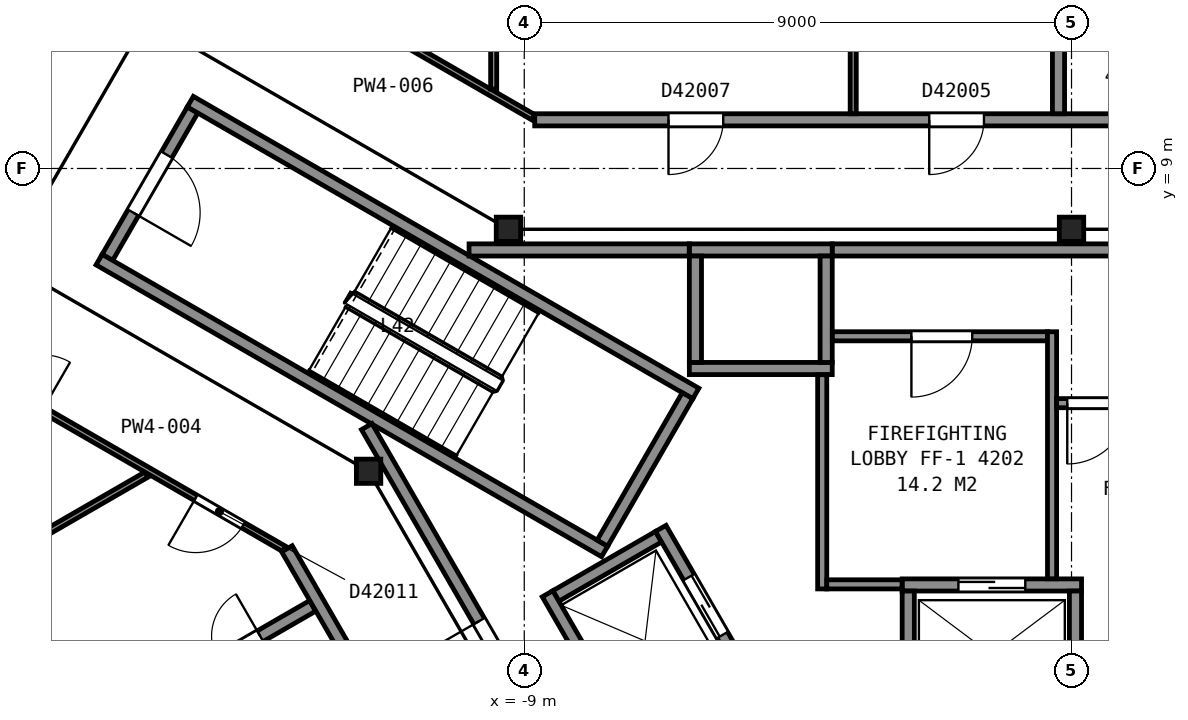
"""IFC4 building model, lengths in metres.
Left out: names, types, materials, properties, quantities, classifications, styles, units other than length and angle.
Written with IfcOpenShell. Run it as: python <this file> out.ifc"""

import sys

from ifc_helpers import new_model, si_unit, direction, frame, frame_2d, origin, origin_2d, place, context, subcontext, project, spatial, rectangle, i_section, extrude, element, fill, save


model = new_model("IFC4")
c1 = context("Model", 3, precision=1e-05, world=origin(), true_north=direction((0.0, 1.0)))
c2 = subcontext(c1, "Body", "Model", "MODEL_VIEW")
j1 = project(units=[si_unit("LENGTHUNIT", "METRE"), si_unit("PLANEANGLEUNIT", "RADIAN")], contexts=[c1])
p1 = place(None, origin())
s1 = spatial("IfcSite", under=j1, at=p1, CompositionType="ELEMENT")
p2 = place(p1, origin())
s2 = spatial("IfcBuilding", under=s1, at=p2, CompositionType="ELEMENT")
p3 = place(p2, frame((0.0, 0.0, 171.0)))
s3 = spatial("IfcBuildingStorey", under=s2, at=p3, CompositionType="ELEMENT", Elevation=171.0)
for number, where, z_axis, x_axis in (
    (1, (0.0, 8.0, 0.0), (0.0, 0.0, 1.0), (1.0, 0.0, 0.0)),
    (2, (-9.26, 8.0, 0.0), (0.0, 0.0, 1.0), (1.0, 0.0, 0.0)),
    (3, (-11.56, 4.02, 0.0), (0.0, 0.0, 1.0), (1.0, 0.0, 0.0)),
):
    element("IfcColumn", number, at=place(p3, frame(where, z_axis=z_axis, x_axis=x_axis)), inside=s3, PredefinedType="COLUMN", context=c2, shape_type="SweptSolid", body=[
        extrude(i_section(OverallWidth=0.401, OverallDepth=0.399, WebThickness=0.025, FlangeThickness=0.04, FilletRadius=0.015, at=origin_2d()), origin(), (0.0, 0.0, 1.0), 3.7),
    ])
p4 = place(p3, frame((-14.455, 9.962, 0.0), z_axis=(0.0, 0.0, 1.0), x_axis=(-0.500049511043, -0.865996816683, 0.0)))
e4 = element("IfcWall", 4, at=p4, inside=s3, PredefinedType="PARTITIONING", context=c2, shape_type="SweptSolid", body=[
    extrude(rectangle(XDim=2.8, YDim=0.2, at=frame_2d((1.4, 0.0))), origin(), (0.0, 0.0, 1.0), 3.45),
])
p5 = place(p4, frame((0.85, 0.0, 0.0)))
e5 = element("IfcOpeningElement", 5, at=p5, cuts=e4, PredefinedType="OPENING", context=c2, shape_type="SweptSolid", body=[
    extrude(rectangle(XDim=1.1, YDim=2.1, at=frame_2d((0.55, 1.05))), frame((0.0, 0.11, 0.0), z_axis=(0.0, -1.0, 0.0), x_axis=(1.0, 0.0, 0.0)), (0.0, 0.0, 1.0), 0.22),
])
for number, where, z_axis, x_axis in (
    (6, (-7.678, 2.701, 0.0), (0.0, 0.0, 1.0), (-0.866, 0.5, 0.0)),
    (7, (-6.178, 5.299, 0.0), (0.0, 0.0, 1.0), (-0.866, 0.5, 0.0)),
):
    element("IfcWall", number, at=place(p3, frame(where, z_axis=z_axis, x_axis=x_axis)), inside=s3, PredefinedType="PARTITIONING", context=c2, shape_type="SweptSolid", body=[
        extrude(rectangle(XDim=9.6, YDim=0.2, at=frame_2d((4.8, 0.0))), origin(), (0.0, 0.0, 1.0), 3.45),
    ])
p6 = place(p3, frame((-6.315, 5.262, 0.0), z_axis=(0.0, 0.0, 1.0), x_axis=(-0.500049511043, -0.865996816683, 0.0)))
e8 = element("IfcWall", 8, at=p6, inside=s3, PredefinedType="PARTITIONING", context=c2, shape_type="SweptSolid", body=[
    extrude(rectangle(XDim=2.8, YDim=0.2, at=frame_2d((1.4, 0.0))), origin(), (0.0, 0.0, 1.0), 3.45),
])
p7 = place(p3, frame((-2.785, 2.15, 0.0), z_axis=(0.0, 0.0, 1.0), x_axis=(1.0, 0.0, 0.0)))
e9 = element("IfcWall", 9, at=p7, inside=s3, PredefinedType="PARTITIONING", context=c2, shape_type="SweptSolid", body=[
    extrude(rectangle(XDim=2.95, YDim=0.2, at=frame_2d((1.475, 0.0))), origin(), (0.0, 0.0, 1.0), 3.7),
])
p8 = place(p7, frame((0.925, 0.0, 0.0)))
e10 = element("IfcOpeningElement", 10, at=p8, cuts=e9, PredefinedType="OPENING", context=c2, shape_type="SweptSolid", body=[
    extrude(rectangle(XDim=1.1, YDim=2.1, at=frame_2d((0.55, 1.05))), frame((0.0, 0.11, 0.0), z_axis=(0.0, -1.0, 0.0), x_axis=(1.0, 0.0, 0.0)), (0.0, 0.0, 1.0), 0.22),
])
for number, where, z_axis, x_axis in (
    (11, (-6.285, 5.71, 0.0), (0.0, 0.0, 1.0), (1.0, 0.0, 0.0)),
    (12, (-6.285, 7.66, 0.0), (0.0, 0.0, 1.0), (1.0, 0.0, 0.0)),
):
    element("IfcWall", number, at=place(p3, frame(where, z_axis=z_axis, x_axis=x_axis)), inside=s3, PredefinedType="PARTITIONING", context=c2, shape_type="SweptSolid", body=[
        extrude(rectangle(XDim=2.35, YDim=0.2, at=frame_2d((1.175, 0.0))), origin(), (0.0, 0.0, 1.0), 3.7),
    ])
for number, where, z_axis, x_axis in (
    (13, (-8.48, 1.969, 0.0), (0.0, 0.0, 1.0), (0.866, 0.5, 0.0)),
    (14, (0.065, 0.1, 0.0), (0.0, 0.0, 1.0), (0.0, 1.0, 0.0)),
    (15, (-2.685, 0.1, 0.0), (0.0, 0.0, 1.0), (0.0, 1.0, 0.0)),
):
    element("IfcWall", number, at=place(p3, frame(where, z_axis=z_axis, x_axis=x_axis)), inside=s3, PredefinedType="PARTITIONING", context=c2, shape_type="SweptSolid", body=[
        extrude(rectangle(XDim=1.95, YDim=0.2, at=frame_2d((0.975, 0.0))), origin(), (0.0, 0.0, 1.0), 3.7),
    ])
for number, where, z_axis, x_axis in (
    (16, (-4.035, 5.81, 0.0), (0.0, 0.0, 1.0), (0.0, 1.0, 0.0)),
    (17, (-6.185, 5.81, 0.0), (0.0, 0.0, 1.0), (0.0, 1.0, 0.0)),
):
    element("IfcWall", number, at=place(p3, frame(where, z_axis=z_axis, x_axis=x_axis)), inside=s3, PredefinedType="PARTITIONING", context=c2, shape_type="SweptSolid", body=[
        extrude(rectangle(XDim=1.75, YDim=0.2, at=frame_2d((0.875, 0.0))), origin(), (0.0, 0.0, 1.0), 3.7),
    ])
p9 = place(p3, frame((-5.28, 0.525, 0.0), z_axis=(0.0, 0.0, 1.0), x_axis=(-0.500037662692, 0.866003658127, 0.0)))
e18 = element("IfcWall", 18, at=p9, inside=s3, PredefinedType="PARTITIONING", context=c2, shape_type="SweptSolid", body=[
    extrude(rectangle(XDim=2.95, YDim=0.2, at=frame_2d((1.475, 0.0))), origin(), (0.0, 0.0, 1.0), 3.7),
])
p10 = place(p9, frame((0.925, 0.0, 0.0)))
e19 = element("IfcOpeningElement", 19, at=p10, cuts=e18, PredefinedType="OPENING", context=c2, shape_type="SweptSolid", body=[
    extrude(rectangle(XDim=1.1, YDim=2.1, at=frame_2d((0.55, 1.05))), frame((0.0, 0.11, 0.0), z_axis=(0.0, -1.0, 0.0), x_axis=(1.0, 0.0, 0.0)), (0.0, 0.0, 1.0), 0.22),
])
p11 = place(p3, frame((-7.242, -0.376, 0.0), z_axis=(0.0, 0.0, 1.0), x_axis=(-0.499996545922, 0.866027397988, 0.0)))
e20 = element("IfcWall", 20, at=p11, inside=s3, PredefinedType="PARTITIONING", context=c2, shape_type="SweptSolid", body=[
    extrude(rectangle(XDim=2.75, YDim=0.2, at=frame_2d((1.375, 0.0))), origin(), (0.0, 0.0, 1.0), 3.7),
])
p12 = place(p3, frame((-11.591, 4.755, 0.0), z_axis=(0.0, 0.0, 1.0), x_axis=(0.500043977787, -0.866000011708, 0.0)))
e21 = element("IfcWall", 21, at=p12, inside=s3, PredefinedType="PARTITIONING", context=c2, shape_type="SweptSolid", body=[
    extrude(rectangle(XDim=6.617, YDim=0.2, at=frame_2d((3.308, 0.0))), origin(), (0.0, 0.0, 1.0), 3.45),
])
p13 = place(p12, frame((3.695, 0.0, 0.0)))
e22 = element("IfcOpeningElement", 22, at=p13, cuts=e21, PredefinedType="OPENING", context=c2, shape_type="SweptSolid", body=[
    extrude(rectangle(XDim=1.8, YDim=2.1, at=frame_2d((0.9, 1.05))), frame((0.0, 0.11, 0.0), z_axis=(0.0, -1.0, 0.0), x_axis=(1.0, 0.0, 0.0)), (0.0, 0.0, 1.0), 0.22),
])
p14 = place(p3, frame((-9.908, 7.66, 0.0), z_axis=(0.0, 0.0, 1.0), x_axis=(1.0, 0.0, 0.0)))
e23 = element("IfcWall", 23, at=p14, inside=s3, PredefinedType="PARTITIONING", context=c2, shape_type="SweptSolid", body=[
    extrude(rectangle(XDim=3.621, YDim=0.2, at=frame_2d((1.811, 0.0))), origin(), (0.0, 0.0, 1.0), 3.45),
])
p15 = place(p3, frame((-4.1, 2.085, 0.0), z_axis=(0.0, 0.0, 1.0), x_axis=(0.0, 1.0, 0.0)))
e24 = element("IfcWall", 24, at=p15, inside=s3, PredefinedType="PARTITIONING", context=c2, shape_type="SweptSolid", body=[
    extrude(rectangle(XDim=3.523, YDim=0.15, at=frame_2d((1.761, 0.0))), origin(), (0.0, 0.0, 1.0), 3.45),
])
p16 = place(p3, frame((-4.025, 2.16, 0.0), z_axis=(0.0, 0.0, 1.0), x_axis=(1.0, 0.0, 0.0)))
e25 = element("IfcWall", 25, at=p16, inside=s3, PredefinedType="PARTITIONING", context=c2, shape_type="SweptSolid", body=[
    extrude(rectangle(XDim=1.238, YDim=0.15, at=frame_2d((0.619, 0.0))), origin(), (0.0, 0.0, 1.0), 3.45),
])
p17 = place(p3, frame((-3.933, 6.24, 0.0), z_axis=(0.0, 0.0, 1.0), x_axis=(1.0, 0.0, 0.0)))
e26 = element("IfcWall", 26, at=p17, inside=s3, PredefinedType="PARTITIONING", context=c2, shape_type="SweptSolid", body=[
    extrude(rectangle(XDim=3.538, YDim=0.15, at=frame_2d((1.769, 0.0))), origin(), (0.0, 0.0, 1.0), 3.45),
])
p18 = place(p17, frame((1.3, 0.0, 0.0)))
e27 = element("IfcOpeningElement", 27, at=p18, cuts=e26, PredefinedType="OPENING", context=c2, shape_type="SweptSolid", body=[
    extrude(rectangle(XDim=1.0, YDim=2.1, at=frame_2d((0.5, 1.05))), frame((0.0, 0.085, 0.0), z_axis=(0.0, -1.0, 0.0), x_axis=(1.0, 0.0, 0.0)), (0.0, 0.0, 1.0), 0.17),
])
p19 = place(p3, frame((-3.933, 7.66, 0.0), z_axis=(0.0, 0.0, 1.0), x_axis=(1.0, 0.0, 0.0)))
e28 = element("IfcWall", 28, at=p19, inside=s3, PredefinedType="PARTITIONING", context=c2, shape_type="SweptSolid", body=[
    extrude(rectangle(XDim=13.841, YDim=0.2, at=frame_2d((6.92, 0.0))), origin(), (0.0, 0.0, 1.0), 3.45),
])
p20 = place(p3, frame((-0.32, 2.252, 0.0), z_axis=(0.0, 0.0, 1.0), x_axis=(0.0, 1.0, 0.0)))
e29 = element("IfcWall", 29, at=p20, inside=s3, PredefinedType="PARTITIONING", context=c2, shape_type="SweptSolid", body=[
    extrude(rectangle(XDim=4.063, YDim=0.15, at=frame_2d((2.031, 0.0))), origin(), (0.0, 0.0, 1.0), 3.45),
])
p21 = place(p3, frame((-0.245, 5.14, 0.0), z_axis=(0.0, 0.0, 1.0), x_axis=(1.0, 0.0, 0.0)))
e30 = element("IfcWall", 30, at=p21, inside=s3, PredefinedType="PARTITIONING", context=c2, shape_type="SweptSolid", body=[
    extrude(rectangle(XDim=5.11, YDim=0.15, at=frame_2d((2.555, 0.0))), origin(), (0.0, 0.0, 1.0), 3.45),
])
p22 = place(p21, frame((0.175, 0.0, 0.0)))
e31 = element("IfcOpeningElement", 31, at=p22, cuts=e30, PredefinedType="OPENING", context=c2, shape_type="SweptSolid", body=[
    extrude(rectangle(XDim=1.0, YDim=2.1, at=frame_2d((0.5, 1.05))), frame((0.0, 0.085, 0.0), z_axis=(0.0, -1.0, 0.0), x_axis=(1.0, 0.0, 0.0)), (0.0, 0.0, 1.0), 0.17),
])
p23 = place(p3, frame((-20.187, 1.094, 0.0), z_axis=(0.0, 0.0, 1.0), x_axis=(0.866060256018, 0.499939629302, 0.0)))
e32 = element("IfcWall", 32, at=p23, inside=s3, PredefinedType="PARTITIONING", context=c2, shape_type="SweptSolid", body=[
    extrude(rectangle(XDim=5.741, YDim=0.1, at=frame_2d((2.871, 0.0))), origin(), (0.0, 0.0, 1.0), 2.713),
])
p24 = place(p3, frame((-19.955, 6.844, 0.0), z_axis=(0.0, 0.0, 1.0), x_axis=(0.500415732313, 0.865785247537, 0.0)))
e33 = element("IfcWall", 33, at=p24, inside=s3, PredefinedType="PARTITIONING", context=c2, shape_type="SweptSolid", body=[
    extrude(rectangle(XDim=8.097, YDim=0.1, at=frame_2d((4.049, 0.0))), origin(), (0.0, 0.0, 1.0), 2.713),
])
p25 = place(p24, frame((3.45, 0.0, 0.0)))
e34 = element("IfcOpeningElement", 34, at=p25, cuts=e33, PredefinedType="OPENING", context=c2, shape_type="SweptSolid", body=[
    extrude(rectangle(XDim=1.2, YDim=2.1, at=frame_2d((0.6, 1.05))), frame((0.0, 0.06, 0.0), z_axis=(0.0, -1.0, 0.0), x_axis=(1.0, 0.0, 0.0)), (0.0, 0.0, 1.0), 0.12),
])
p26 = place(p3, frame((-12.952, 2.744, 0.0), z_axis=(0.0, 0.0, 1.0), x_axis=(-0.86608949446, 0.499888975259, 0.0)))
e35 = element("IfcWall", 35, at=p26, inside=s3, PredefinedType="PARTITIONING", context=c2, shape_type="SweptSolid", body=[
    extrude(rectangle(XDim=8.165, YDim=0.1, at=frame_2d((4.083, 0.0))), origin(), (0.0, 0.0, 1.0), 2.713),
])
p27 = place(p26, frame((4.581, 0.0, 0.0)))
e36 = element("IfcOpeningElement", 36, at=p27, cuts=e35, PredefinedType="OPENING", context=c2, shape_type="SweptSolid", body=[
    extrude(rectangle(XDim=0.9, YDim=2.1, at=frame_2d((0.45, 1.05))), frame((0.0, 0.06, 0.0), z_axis=(0.0, -1.0, 0.0), x_axis=(1.0, 0.0, 0.0)), (0.0, 0.0, 1.0), 0.12),
])
p28 = place(p26, frame((0.776, 0.0, 0.0)))
e37 = element("IfcOpeningElement", 37, at=p28, cuts=e35, PredefinedType="OPENING", context=c2, shape_type="SweptSolid", body=[
    extrude(rectangle(XDim=0.9, YDim=2.1, at=frame_2d((0.45, 1.05))), frame((0.0, 0.06, 0.0), z_axis=(0.0, -1.0, 0.0), x_axis=(1.0, 0.0, 0.0)), (0.0, 0.0, 1.0), 0.12),
])
p29 = place(p3, frame((-15.921, 13.923, 0.0), z_axis=(0.0, 0.0, 1.0), x_axis=(0.866088973199, -0.499889878377, 0.0)))
e38 = element("IfcWall", 38, at=p29, inside=s3, PredefinedType="PARTITIONING", context=c2, shape_type="SweptSolid", body=[
    extrude(rectangle(XDim=8.163, YDim=0.1, at=frame_2d((4.082, 0.0))), origin(), (0.0, 0.0, 1.0), 2.713),
])
p30 = place(p29, frame((3.532, 0.0, 0.0)))
e39 = element("IfcOpeningElement", 39, at=p30, cuts=e38, PredefinedType="OPENING", context=c2, shape_type="SweptSolid", body=[
    extrude(rectangle(XDim=0.9, YDim=2.1, at=frame_2d((0.45, 1.05))), frame((0.0, 0.06, 0.0), z_axis=(0.0, -1.0, 0.0), x_axis=(1.0, 0.0, 0.0)), (0.0, 0.0, 1.0), 0.12),
])
p31 = place(p3, frame((-12.481, 1.805, 0.0), z_axis=(0.0, 0.0, 1.0), x_axis=(-0.866052556263, -0.499952967579, 0.0)))
e40 = element("IfcWall", 40, at=p31, inside=s3, PredefinedType="PARTITIONING", context=c2, shape_type="SweptSolid", body=[
    extrude(rectangle(XDim=2.995, YDim=0.2, at=frame_2d((1.498, 0.0))), origin(), (0.0, 0.0, 1.0), 2.713),
])
p32 = place(p31, frame((0.995, 0.0, 0.0)))
e41 = element("IfcOpeningElement", 41, at=p32, cuts=e40, PredefinedType="OPENING", context=c2, shape_type="SweptSolid", body=[
    extrude(rectangle(XDim=0.8, YDim=2.1, at=frame_2d((0.4, 1.05))), frame((0.0, 0.11, 0.0), z_axis=(0.0, -1.0, 0.0), x_axis=(1.0, 0.0, 0.0)), (0.0, 0.0, 1.0), 0.22),
])
p33 = place(p3, frame((-4.075, -12.545, 0.0), z_axis=(0.0, 0.0, 1.0), x_axis=(-0.499999743747, 0.866025551732, 0.0)))
e42 = element("IfcWall", 42, at=p33, inside=s3, PredefinedType="PARTITIONING", context=c2, shape_type="SweptSolid", body=[
    extrude(rectangle(XDim=17.656, YDim=0.2, at=frame_2d((8.828, 0.0))), origin(), (0.0, 0.0, 1.0), 2.713),
])
p34 = place(p33, frame((10.08, 0.0, 0.0)))
e43 = element("IfcOpeningElement", 43, at=p34, cuts=e42, PredefinedType="OPENING", context=c2, shape_type="SweptSolid", body=[
    extrude(rectangle(XDim=0.9, YDim=2.1, at=frame_2d((0.45, 1.05))), frame((0.0, 0.11, 0.0), z_axis=(0.0, -1.0, 0.0), x_axis=(1.0, 0.0, 0.0)), (0.0, 0.0, 1.0), 0.22),
])
p35 = place(p33, frame((6.068, 0.0, 0.0)))
e44 = element("IfcOpeningElement", 44, at=p35, cuts=e42, PredefinedType="OPENING", context=c2, shape_type="SweptSolid", body=[
    extrude(rectangle(XDim=0.9, YDim=2.1, at=frame_2d((0.45, 1.05))), frame((0.0, 0.11, 0.0), z_axis=(0.0, -1.0, 0.0), x_axis=(1.0, 0.0, 0.0)), (0.0, 0.0, 1.0), 0.22),
])
p36 = place(p3, frame((-9.503, 10.306, 0.0), z_axis=(0.0, 0.0, 1.0), x_axis=(0.0, 1.0, 0.0)))
e45 = element("IfcWall", 45, at=p36, inside=s3, PredefinedType="PARTITIONING", context=c2, shape_type="SweptSolid", body=[
    extrude(rectangle(XDim=6.629, YDim=0.1, at=frame_2d((3.315, 0.0))), origin(), (0.0, 0.0, 1.0), 2.713),
])
p37 = place(p3, frame((-8.828, 9.8, 0.0), z_axis=(0.0, 0.0, 1.0), x_axis=(1.0, 0.0, 0.0)))
e46 = element("IfcWall", 46, at=p37, inside=s3, PredefinedType="PARTITIONING", context=c2, shape_type="SweptSolid", body=[
    extrude(rectangle(XDim=17.656, YDim=0.2, at=frame_2d((8.828, 0.0))), origin(), (0.0, 0.0, 1.0), 2.713),
])
p38 = place(p37, frame((14.864, 0.0, 0.0)))
e47 = element("IfcOpeningElement", 47, at=p38, cuts=e46, PredefinedType="OPENING", context=c2, shape_type="SweptSolid", body=[
    extrude(rectangle(XDim=0.9, YDim=2.1, at=frame_2d((0.45, 1.05))), frame((0.0, 0.11, 0.0), z_axis=(0.0, -1.0, 0.0), x_axis=(1.0, 0.0, 0.0)), (0.0, 0.0, 1.0), 0.22),
])
p39 = place(p37, frame((6.488, 0.0, 0.0)))
e48 = element("IfcOpeningElement", 48, at=p39, cuts=e46, PredefinedType="OPENING", context=c2, shape_type="SweptSolid", body=[
    extrude(rectangle(XDim=0.9, YDim=2.1, at=frame_2d((0.45, 1.05))), frame((0.0, 0.11, 0.0), z_axis=(0.0, -1.0, 0.0), x_axis=(1.0, 0.0, 0.0)), (0.0, 0.0, 1.0), 0.22),
])
p40 = place(p37, frame((2.2, 0.0, 0.0)))
e49 = element("IfcOpeningElement", 49, at=p40, cuts=e46, PredefinedType="OPENING", context=c2, shape_type="SweptSolid", body=[
    extrude(rectangle(XDim=0.9, YDim=2.1, at=frame_2d((0.45, 1.05))), frame((0.0, 0.11, 0.0), z_axis=(0.0, -1.0, 0.0), x_axis=(1.0, 0.0, 0.0)), (0.0, 0.0, 1.0), 0.22),
])
p41 = place(p3, frame((-3.59, 9.9, 0.0), z_axis=(0.0, 0.0, 1.0), x_axis=(0.0, 1.0, 0.0)))
e50 = element("IfcWall", 50, at=p41, inside=s3, PredefinedType="PARTITIONING", context=c2, shape_type="SweptSolid", body=[
    extrude(rectangle(XDim=7.035, YDim=0.1, at=frame_2d((3.518, 0.0))), origin(), (0.0, 0.0, 1.0), 2.713),
])
p42 = place(p3, frame((-0.214, 9.9, 0.0), z_axis=(0.0, 0.0, 1.0), x_axis=(0.0, 1.0, 0.0)))
e51 = element("IfcWall", 51, at=p42, inside=s3, PredefinedType="PARTITIONING", context=c2, shape_type="SweptSolid", body=[
    extrude(rectangle(XDim=2.8, YDim=0.2, at=frame_2d((1.4, 0.0))), origin(), (0.0, 0.0, 1.0), 2.713),
])
p43 = place(p5, origin())
e52 = element("IfcDoor", 52, at=p43, inside=s3, OperationType="SINGLE_SWING_RIGHT", PredefinedType="DOOR", context=c2, shape_type="SweptSolid", body=[
    extrude(rectangle(XDim=1.1, YDim=2.1, at=frame_2d((0.55, 1.05))), frame((0.0, 0.025, 0.0), z_axis=(0.0, -1.0, 0.0), x_axis=(1.0, 0.0, 0.0)), (0.0, 0.0, 1.0), 0.05),
])
fill(e5, e52)
p44 = place(p8, origin())
e53 = element("IfcDoor", 53, at=p44, inside=s3, OperationType="SLIDING_TO_LEFT", PredefinedType="DOOR", context=c2, shape_type="SweptSolid", body=[
    extrude(rectangle(XDim=1.1, YDim=2.1, at=frame_2d((0.55, 1.05))), frame((0.0, 0.025, 0.0), z_axis=(0.0, -1.0, 0.0), x_axis=(1.0, 0.0, 0.0)), (0.0, 0.0, 1.0), 0.05),
])
fill(e10, e53)
p45 = place(p10, origin())
e54 = element("IfcDoor", 54, at=p45, inside=s3, OperationType="SLIDING_TO_LEFT", PredefinedType="DOOR", context=c2, shape_type="SweptSolid", body=[
    extrude(rectangle(XDim=1.1, YDim=2.1, at=frame_2d((0.55, 1.05))), frame((0.0, 0.025, 0.0), z_axis=(0.0, -1.0, 0.0), x_axis=(1.0, 0.0, 0.0)), (0.0, 0.0, 1.0), 0.05),
])
fill(e19, e54)
p46 = place(p13, origin())
e55 = element("IfcDoor", 55, at=p46, inside=s3, OperationType="DOUBLE_DOOR_SINGLE_SWING", PredefinedType="DOOR", context=c2, shape_type="SweptSolid", body=[
    extrude(rectangle(XDim=1.8, YDim=2.1, at=frame_2d((0.9, 1.05))), frame((0.0, 0.025, 0.0), z_axis=(0.0, -1.0, 0.0), x_axis=(1.0, 0.0, 0.0)), (0.0, 0.0, 1.0), 0.05),
])
fill(e22, e55)
p47 = place(p18, origin())
e56 = element("IfcDoor", 56, at=p47, inside=s3, OperationType="SINGLE_SWING_LEFT", PredefinedType="DOOR", context=c2, shape_type="SweptSolid", body=[
    extrude(rectangle(XDim=1.0, YDim=2.1, at=frame_2d((0.5, 1.05))), frame((0.0, 0.025, 0.0), z_axis=(0.0, -1.0, 0.0), x_axis=(1.0, 0.0, 0.0)), (0.0, 0.0, 1.0), 0.05),
])
fill(e27, e56)
p48 = place(p22, origin())
e57 = element("IfcDoor", 57, at=p48, inside=s3, OperationType="SINGLE_SWING_LEFT", PredefinedType="DOOR", context=c2, shape_type="SweptSolid", body=[
    extrude(rectangle(XDim=1.0, YDim=2.1, at=frame_2d((0.5, 1.05))), frame((0.0, 0.025, 0.0), z_axis=(0.0, -1.0, 0.0), x_axis=(1.0, 0.0, 0.0)), (0.0, 0.0, 1.0), 0.05),
])
fill(e31, e57)
p49 = place(p28, origin())
e58 = element("IfcDoor", 58, at=p49, inside=s3, OperationType="SINGLE_SWING_RIGHT", PredefinedType="DOOR", context=c2, shape_type="SweptSolid", body=[
    extrude(rectangle(XDim=0.9, YDim=2.1, at=frame_2d((0.45, 1.05))), frame((0.0, 0.025, 0.0), z_axis=(0.0, -1.0, 0.0), x_axis=(1.0, 0.0, 0.0)), (0.0, 0.0, 1.0), 0.05),
])
fill(e37, e58)
p50 = place(p32, origin())
e59 = element("IfcDoor", 59, at=p50, inside=s3, OperationType="SINGLE_SWING_LEFT", PredefinedType="DOOR", context=c2, shape_type="SweptSolid", body=[
    extrude(rectangle(XDim=0.8, YDim=2.1, at=frame_2d((0.4, 1.05))), frame((0.0, 0.025, 0.0), z_axis=(0.0, -1.0, 0.0), x_axis=(1.0, 0.0, 0.0)), (0.0, 0.0, 1.0), 0.05),
])
fill(e41, e59)
p51 = place(p39, origin())
e60 = element("IfcDoor", 60, at=p51, inside=s3, OperationType="SINGLE_SWING_LEFT", PredefinedType="DOOR", context=c2, shape_type="SweptSolid", body=[
    extrude(rectangle(XDim=0.9, YDim=2.1, at=frame_2d((0.45, 1.05))), frame((0.0, 0.025, 0.0), z_axis=(0.0, -1.0, 0.0), x_axis=(1.0, 0.0, 0.0)), (0.0, 0.0, 1.0), 0.05),
])
fill(e48, e60)
p52 = place(p40, origin())
e61 = element("IfcDoor", 61, at=p52, inside=s3, OperationType="SINGLE_SWING_LEFT", PredefinedType="DOOR", context=c2, shape_type="SweptSolid", body=[
    extrude(rectangle(XDim=0.9, YDim=2.1, at=frame_2d((0.45, 1.05))), frame((0.0, 0.025, 0.0), z_axis=(0.0, -1.0, 0.0), x_axis=(1.0, 0.0, 0.0)), (0.0, 0.0, 1.0), 0.05),
])
fill(e49, e61)
save(model, sys.argv[1])
